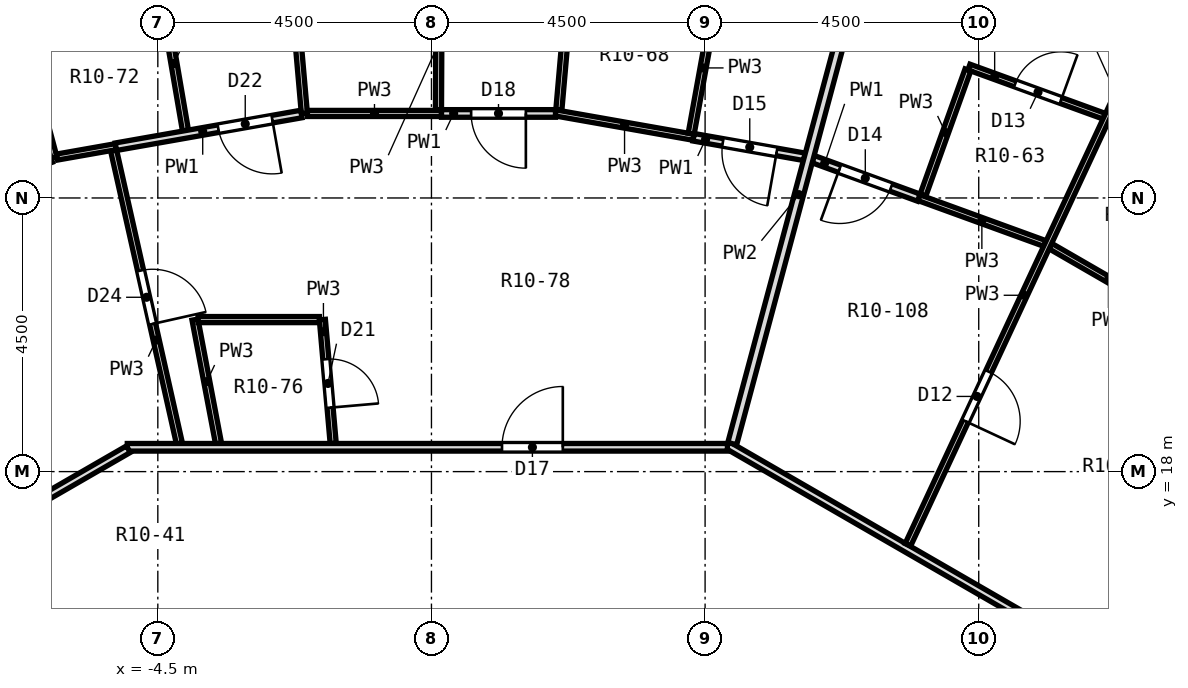
"""IFC4 building model, lengths in metres.
Left out: names, types, materials, properties, quantities, classifications, styles, units other than length and angle.
Written with IfcOpenShell. Run it as: python <this file> out.ifc"""

import sys

from ifc_helpers import new_model, si_unit, direction, frame, frame_2d, origin, place, context, subcontext, project, spatial, rectangle, extrude, element, fill, save


model = new_model("IFC4")
c1 = context("Model", 3, precision=1e-05, world=origin(), true_north=direction((0.0, 1.0)))
c2 = subcontext(c1, "Body", "Model", "MODEL_VIEW")
j1 = project(units=[si_unit("LENGTHUNIT", "METRE"), si_unit("PLANEANGLEUNIT", "RADIAN")], contexts=[c1])
p1 = place(None, origin())
s1 = spatial("IfcSite", under=j1, at=p1, CompositionType="ELEMENT")
p2 = place(p1, origin())
s2 = spatial("IfcBuilding", under=s1, at=p2, CompositionType="ELEMENT")
p3 = place(p2, frame((0.0, 0.0, 36.2)))
s3 = spatial("IfcBuildingStorey", under=s2, at=p3, CompositionType="ELEMENT", Elevation=36.2)
p4 = place(p3, frame((-2.404, 27.485, 0.0), z_axis=(0.0, 0.0, 1.0), x_axis=(0.08706456859, -0.996202670593, 0.0)))
e1 = element("IfcWall", 1, at=p4, inside=s3, PredefinedType="PARTITIONING", context=c2, shape_type="SweptSolid", body=[
    extrude(rectangle(XDim=3.609, YDim=0.1, at=frame_2d((1.804, 0.0))), origin(), (0.0, 0.0, 1.0), 2.75),
])
p5 = place(p3, frame((-1.794, 20.5, 0.0), z_axis=(0.0, 0.0, 1.0), x_axis=(0.087005571392, -0.996207824978, 0.0)))
e2 = element("IfcWall", 2, at=p5, inside=s3, PredefinedType="PARTITIONING", context=c2, shape_type="SweptSolid", body=[
    extrude(rectangle(XDim=2.046, YDim=0.1, at=frame_2d((1.023, 0.0))), origin(), (0.0, 0.0, 1.0), 2.75),
])
p6 = place(p5, frame((0.654, 0.0, 0.0)))
e3 = element("IfcOpeningElement", 3, at=p6, cuts=e2, PredefinedType="OPENING", context=c2, shape_type="SweptSolid", body=[
    extrude(rectangle(XDim=0.8, YDim=2.1, at=frame_2d((0.4, 1.05))), frame((0.0, 0.062, 0.0), z_axis=(0.0, -1.0, 0.0), x_axis=(1.0, 0.0, 0.0)), (0.0, 0.0, 1.0), 0.124),
])
p7 = place(p3, frame((-4.423, 25.814, 0.0), z_axis=(0.0, 0.0, 1.0), x_axis=(0.168697286213, -0.985667908387, 0.0)))
e4 = element("IfcWall", 4, at=p7, inside=s3, PredefinedType="PARTITIONING", context=c2, shape_type="SweptSolid", body=[
    extrude(rectangle(XDim=2.237, YDim=0.1, at=frame_2d((1.119, 0.0))), origin(), (0.0, 0.0, 1.0), 2.75),
])
p8 = place(p3, frame((-3.889, 20.5, 0.0), z_axis=(0.0, 0.0, 1.0), x_axis=(0.186603866767, -0.982435238022, 0.0)))
e5 = element("IfcWall", 5, at=p8, inside=s3, PredefinedType="PARTITIONING", context=c2, shape_type="SweptSolid", body=[
    extrude(rectangle(XDim=2.075, YDim=0.1, at=frame_2d((1.038, 0.0))), origin(), (0.0, 0.0, 1.0), 2.75),
])
p9 = place(p3, frame((-5.228, 23.285, 0.0), z_axis=(0.0, 0.0, 1.0), x_axis=(0.219089188196, -0.975704836319, 0.0)))
e6 = element("IfcWall", 6, at=p9, inside=s3, PredefinedType="PARTITIONING", context=c2, shape_type="SweptSolid", body=[
    extrude(rectangle(XDim=4.944, YDim=0.1, at=frame_2d((2.472, 0.0))), origin(), (0.0, 0.0, 1.0), 2.75),
])
p10 = place(p9, frame((2.028, 0.0, 0.0)))
e7 = element("IfcOpeningElement", 7, at=p10, cuts=e6, PredefinedType="OPENING", context=c2, shape_type="SweptSolid", body=[
    extrude(rectangle(XDim=0.9, YDim=2.1, at=frame_2d((0.45, 1.05))), frame((0.0, 0.062, 0.0), z_axis=(0.0, -1.0, 0.0), x_axis=(1.0, 0.0, 0.0)), (0.0, 0.0, 1.0), 0.124),
])
p11 = place(p3, frame((-7.143, 26.649, 0.0), z_axis=(0.0, 0.0, 1.0), x_axis=(0.259371754041, -0.965777558864, 0.0)))
e8 = element("IfcWall", 8, at=p11, inside=s3, PredefinedType="PARTITIONING", context=c2, shape_type="SweptSolid", body=[
    extrude(rectangle(XDim=3.609, YDim=0.1, at=frame_2d((1.804, 0.0))), origin(), (0.0, 0.0, 1.0), 2.75),
])
p12 = place(p3, frame((4.867, 18.436, 0.0), z_axis=(0.0, 0.0, 1.0), x_axis=(0.86605048973, -0.49995654735, 0.0)))
e9 = element("IfcWall", 9, at=p12, inside=s3, PredefinedType="PARTITIONING", context=c2, shape_type="SweptSolid", body=[
    extrude(rectangle(XDim=9.871, YDim=0.125, at=frame_2d((4.935, 0.0))), origin(), (0.0, 0.0, 1.0), 2.75),
])
p13 = place(p3, frame((10.178, 21.709, 0.0), z_axis=(0.0, 0.0, 1.0), x_axis=(0.865986508459, -0.50006736263, 0.0)))
e10 = element("IfcWall", 10, at=p13, inside=s3, PredefinedType="PARTITIONING", context=c2, shape_type="SweptSolid", body=[
    extrude(rectangle(XDim=2.206, YDim=0.1, at=frame_2d((1.103, 0.0))), origin(), (0.0, 0.0, 1.0), 2.75),
])
p14 = place(p3, frame((11.154, 23.802, 0.0), z_axis=(0.0, 0.0, 1.0), x_axis=(0.865910737143, -0.500198555877, 0.0)))
e11 = element("IfcWall", 11, at=p14, inside=s3, PredefinedType="PARTITIONING", context=c2, shape_type="SweptSolid", body=[
    extrude(rectangle(XDim=2.367, YDim=0.1, at=frame_2d((1.184, 0.0))), origin(), (0.0, 0.0, 1.0), 2.75),
])
p15 = place(p14, frame((0.759, 0.0, 0.0)))
e12 = element("IfcOpeningElement", 12, at=p15, cuts=e11, PredefinedType="OPENING", context=c2, shape_type="SweptSolid", body=[
    extrude(rectangle(XDim=0.8, YDim=2.1, at=frame_2d((0.4, 1.05))), frame((0.0, 0.062, 0.0), z_axis=(0.0, -1.0, 0.0), x_axis=(1.0, 0.0, 0.0)), (0.0, 0.0, 1.0), 0.124),
])
p16 = place(p3, frame((8.015, 22.505, 0.0), z_axis=(0.0, 0.0, 1.0), x_axis=(0.939744943051, -0.341876354856, 0.0)))
e13 = element("IfcWall", 13, at=p16, inside=s3, PredefinedType="PARTITIONING", context=c2, shape_type="SweptSolid", body=[
    extrude(rectangle(XDim=2.206, YDim=0.1, at=frame_2d((1.103, 0.0))), origin(), (0.0, 0.0, 1.0), 2.75),
])
p17 = place(p3, frame((6.278, 23.138, 0.0), z_axis=(0.0, 0.0, 1.0), x_axis=(0.939538772486, -0.34244254262, 0.0)))
e14 = element("IfcWall", 14, at=p17, inside=s3, PredefinedType="PARTITIONING", context=c2, shape_type="SweptSolid", body=[
    extrude(rectangle(XDim=1.849, YDim=0.125, at=frame_2d((0.925, 0.0))), origin(), (0.0, 0.0, 1.0), 2.75),
])
p18 = place(p17, frame((0.462, 0.0, 0.0)))
e15 = element("IfcOpeningElement", 15, at=p18, cuts=e14, PredefinedType="OPENING", context=c2, shape_type="SweptSolid", body=[
    extrude(rectangle(XDim=0.9, YDim=2.1, at=frame_2d((0.45, 1.05))), frame((0.0, 0.074, 0.0), z_axis=(0.0, -1.0, 0.0), x_axis=(1.0, 0.0, 0.0)), (0.0, 0.0, 1.0), 0.149),
])
p19 = place(p3, frame((8.839, 24.653, 0.0), z_axis=(0.0, 0.0, 1.0), x_axis=(0.939787401385, -0.341759623416, 0.0)))
e16 = element("IfcWall", 16, at=p19, inside=s3, PredefinedType="PARTITIONING", context=c2, shape_type="SweptSolid", body=[
    extrude(rectangle(XDim=2.367, YDim=0.1, at=frame_2d((1.184, 0.0))), origin(), (0.0, 0.0, 1.0), 2.75),
])
p20 = place(p19, frame((0.809, 0.0, 0.0)))
e17 = element("IfcOpeningElement", 17, at=p20, cuts=e16, PredefinedType="OPENING", context=c2, shape_type="SweptSolid", body=[
    extrude(rectangle(XDim=0.8, YDim=2.1, at=frame_2d((0.4, 1.05))), frame((0.0, 0.062, 0.0), z_axis=(0.0, -1.0, 0.0), x_axis=(1.0, 0.0, 0.0)), (0.0, 0.0, 1.0), 0.124),
])
p21 = place(p3, frame((2.04, 23.899, 0.0), z_axis=(0.0, 0.0, 1.0), x_axis=(0.984796344358, -0.173712866935, 0.0)))
e18 = element("IfcWall", 18, at=p21, inside=s3, PredefinedType="PARTITIONING", context=c2, shape_type="SweptSolid", body=[
    extrude(rectangle(XDim=2.306, YDim=0.1, at=frame_2d((1.153, 0.0))), origin(), (0.0, 0.0, 1.0), 2.75),
])
p22 = place(p3, frame((4.311, 23.498, 0.0), z_axis=(0.0, 0.0, 1.0), x_axis=(0.984802153769, -0.173679929558, 0.0)))
e19 = element("IfcWall", 19, at=p22, inside=s3, PredefinedType="PARTITIONING", context=c2, shape_type="SweptSolid", body=[
    extrude(rectangle(XDim=1.85, YDim=0.125, at=frame_2d((0.925, 0.0))), origin(), (0.0, 0.0, 1.0), 2.75),
])
p23 = place(p22, frame((0.488, 0.0, 0.0)))
e20 = element("IfcOpeningElement", 20, at=p23, cuts=e19, PredefinedType="OPENING", context=c2, shape_type="SweptSolid", body=[
    extrude(rectangle(XDim=0.9, YDim=2.1, at=frame_2d((0.45, 1.05))), frame((0.0, 0.074, 0.0), z_axis=(0.0, -1.0, 0.0), x_axis=(1.0, 0.0, 0.0)), (0.0, 0.0, 1.0), 0.149),
])
p24 = place(p3, frame((-5.002, 18.4, 0.0), z_axis=(0.0, 0.0, 1.0), x_axis=(1.0, 0.0, 0.0)))
e21 = element("IfcWall", 21, at=p24, inside=s3, PredefinedType="PARTITIONING", context=c2, shape_type="SweptSolid", body=[
    extrude(rectangle(XDim=9.87, YDim=0.125, at=frame_2d((4.935, 0.0))), origin(), (0.0, 0.0, 1.0), 2.75),
])
p25 = place(p24, frame((6.162, 0.0, 0.0)))
e22 = element("IfcOpeningElement", 22, at=p25, cuts=e21, PredefinedType="OPENING", context=c2, shape_type="SweptSolid", body=[
    extrude(rectangle(XDim=1.0, YDim=2.1, at=frame_2d((0.5, 1.05))), frame((0.0, 0.074, 0.0), z_axis=(0.0, -1.0, 0.0), x_axis=(1.0, 0.0, 0.0)), (0.0, 0.0, 1.0), 0.149),
])
p26 = place(p3, frame((-3.839, 20.5, 0.0), z_axis=(0.0, 0.0, 1.0), x_axis=(1.0, 0.0, 0.0)))
e23 = element("IfcWall", 23, at=p26, inside=s3, PredefinedType="PARTITIONING", context=c2, shape_type="SweptSolid", body=[
    extrude(rectangle(XDim=1.995, YDim=0.1, at=frame_2d((0.998, 0.0))), origin(), (0.0, 0.0, 1.0), 2.75),
])
p27 = place(p3, frame((-2.04, 23.89, 0.0), z_axis=(0.0, 0.0, 1.0), x_axis=(1.0, 0.0, 0.0)))
e24 = element("IfcWall", 24, at=p27, inside=s3, PredefinedType="PARTITIONING", context=c2, shape_type="SweptSolid", body=[
    extrude(rectangle(XDim=2.205, YDim=0.1, at=frame_2d((1.103, 0.0))), origin(), (0.0, 0.0, 1.0), 2.75),
])
p28 = place(p3, frame((0.165, 23.89, 0.0), z_axis=(0.0, 0.0, 1.0), x_axis=(1.0, 0.0, 0.0)))
e25 = element("IfcWall", 25, at=p28, inside=s3, PredefinedType="PARTITIONING", context=c2, shape_type="SweptSolid", body=[
    extrude(rectangle(XDim=1.875, YDim=0.125, at=frame_2d((0.938, 0.0))), origin(), (0.0, 0.0, 1.0), 2.75),
])
p29 = place(p28, frame((0.488, 0.0, 0.0)))
e26 = element("IfcOpeningElement", 26, at=p29, cuts=e25, PredefinedType="OPENING", context=c2, shape_type="SweptSolid", body=[
    extrude(rectangle(XDim=0.9, YDim=2.1, at=frame_2d((0.45, 1.05))), frame((0.0, 0.074, 0.0), z_axis=(0.0, -1.0, 0.0), x_axis=(1.0, 0.0, 0.0)), (0.0, 0.0, 1.0), 0.149),
])
p30 = place(p3, frame((-6.158, 23.173, 0.0), z_axis=(0.0, 0.0, 1.0), x_axis=(0.984806059991, 0.173657778994, 0.0)))
e27 = element("IfcWall", 27, at=p30, inside=s3, PredefinedType="PARTITIONING", context=c2, shape_type="SweptSolid", body=[
    extrude(rectangle(XDim=0.983, YDim=0.1, at=frame_2d((0.491, 0.0))), origin(), (0.0, 0.0, 1.0), 2.75),
])
p31 = place(p3, frame((-5.19, 23.343, 0.0), z_axis=(0.0, 0.0, 1.0), x_axis=(0.984810524367, 0.173632459798, 0.0)))
e28 = element("IfcWall", 28, at=p31, inside=s3, PredefinedType="PARTITIONING", context=c2, shape_type="SweptSolid", body=[
    extrude(rectangle(XDim=3.098, YDim=0.125, at=frame_2d((1.549, 0.0))), origin(), (0.0, 0.0, 1.0), 2.75),
])
p32 = place(p31, frame((1.71, 0.0, 0.0)))
e29 = element("IfcOpeningElement", 29, at=p32, cuts=e28, PredefinedType="OPENING", context=c2, shape_type="SweptSolid", body=[
    extrude(rectangle(XDim=0.9, YDim=2.1, at=frame_2d((0.45, 1.05))), frame((0.0, 0.074, 0.0), z_axis=(0.0, -1.0, 0.0), x_axis=(1.0, 0.0, 0.0)), (0.0, 0.0, 1.0), 0.149),
])
p33 = place(p3, frame((-8.015, 22.505, 0.0), z_axis=(0.0, 0.0, 1.0), x_axis=(0.939553626447, 0.342401785962, 0.0)))
e30 = element("IfcWall", 30, at=p33, inside=s3, PredefinedType="PARTITIONING", context=c2, shape_type="SweptSolid", body=[
    extrude(rectangle(XDim=1.875, YDim=0.125, at=frame_2d((0.937, 0.0))), origin(), (0.0, 0.0, 1.0), 2.75),
])
p34 = place(p33, frame((0.487, 0.0, 0.0)))
e31 = element("IfcOpeningElement", 31, at=p34, cuts=e30, PredefinedType="OPENING", context=c2, shape_type="SweptSolid", body=[
    extrude(rectangle(XDim=0.9, YDim=2.1, at=frame_2d((0.45, 1.05))), frame((0.0, 0.074, 0.0), z_axis=(0.0, -1.0, 0.0), x_axis=(1.0, 0.0, 0.0)), (0.0, 0.0, 1.0), 0.149),
])
p35 = place(p3, frame((-13.532, 13.434, 0.0), z_axis=(0.0, 0.0, 1.0), x_axis=(0.86605048973, 0.49995654735, 0.0)))
e32 = element("IfcWall", 32, at=p35, inside=s3, PredefinedType="PARTITIONING", context=c2, shape_type="SweptSolid", body=[
    extrude(rectangle(XDim=9.871, YDim=0.125, at=frame_2d((4.935, 0.0))), origin(), (0.0, 0.0, 1.0), 2.75),
])
p36 = place(p35, frame((4.931, 0.0, 0.0)))
e33 = element("IfcOpeningElement", 33, at=p36, cuts=e32, PredefinedType="OPENING", context=c2, shape_type="SweptSolid", body=[
    extrude(rectangle(XDim=1.0, YDim=2.1, at=frame_2d((0.5, 1.05))), frame((0.0, 0.074, 0.0), z_axis=(0.0, -1.0, 0.0), x_axis=(1.0, 0.0, 0.0)), (0.0, 0.0, 1.0), 0.149),
])
p37 = place(p35, frame((1.711, 0.0, 0.0)))
e34 = element("IfcOpeningElement", 34, at=p37, cuts=e32, PredefinedType="OPENING", context=c2, shape_type="SweptSolid", body=[
    extrude(rectangle(XDim=0.9, YDim=2.1, at=frame_2d((0.45, 1.05))), frame((0.0, 0.074, 0.0), z_axis=(0.0, -1.0, 0.0), x_axis=(1.0, 0.0, 0.0)), (0.0, 0.0, 1.0), 0.149),
])
p38 = place(p3, frame((7.835, 16.796, 0.0), z_axis=(0.0, 0.0, 1.0), x_axis=(0.422351185038, 0.906432279046, 0.0)))
e35 = element("IfcWall", 35, at=p38, inside=s3, PredefinedType="PARTITIONING", context=c2, shape_type="SweptSolid", body=[
    extrude(rectangle(XDim=9.057, YDim=0.1, at=frame_2d((4.528, 0.0))), origin(), (0.0, 0.0, 1.0), 2.75),
])
p39 = place(p38, frame((2.243, 0.0, 0.0)))
e36 = element("IfcOpeningElement", 36, at=p39, cuts=e35, PredefinedType="OPENING", context=c2, shape_type="SweptSolid", body=[
    extrude(rectangle(XDim=0.9, YDim=2.1, at=frame_2d((0.45, 1.05))), frame((0.0, 0.062, 0.0), z_axis=(0.0, -1.0, 0.0), x_axis=(1.0, 0.0, 0.0)), (0.0, 0.0, 1.0), 0.124),
])
p40 = place(p3, frame((8.083, 22.547, 0.0), z_axis=(0.0, 0.0, 1.0), x_axis=(0.337806451735, 0.9412155976, 0.0)))
e37 = element("IfcWall", 37, at=p40, inside=s3, PredefinedType="PARTITIONING", context=c2, shape_type="SweptSolid", body=[
    extrude(rectangle(XDim=2.188, YDim=0.1, at=frame_2d((1.094, 0.0))), origin(), (0.0, 0.0, 1.0), 2.75),
])
p41 = place(p3, frame((4.947, 18.46, 0.0), z_axis=(0.0, 0.0, 1.0), x_axis=(0.258782623342, 0.965935584734, 0.0)))
e38 = element("IfcWall", 38, at=p41, inside=s3, PredefinedType="PARTITIONING", context=c2, shape_type="SweptSolid", body=[
    extrude(rectangle(XDim=8.479, YDim=0.15, at=frame_2d((4.239, 0.0))), origin(), (0.0, 0.0, 1.0), 2.75),
])
p42 = place(p3, frame((4.271, 23.556, 0.0), z_axis=(0.0, 0.0, 1.0), x_axis=(0.178240802931, 0.983986898373, 0.0)))
e39 = element("IfcWall", 39, at=p42, inside=s3, PredefinedType="PARTITIONING", context=c2, shape_type="SweptSolid", body=[
    extrude(rectangle(XDim=2.2, YDim=0.1, at=frame_2d((1.1, 0.0))), origin(), (0.0, 0.0, 1.0), 2.75),
])
p43 = place(p3, frame((2.095, 23.952, 0.0), z_axis=(0.0, 0.0, 1.0), x_axis=(0.087084114239, 0.996200962179, 0.0)))
e40 = element("IfcWall", 40, at=p43, inside=s3, PredefinedType="PARTITIONING", context=c2, shape_type="SweptSolid", body=[
    extrude(rectangle(XDim=3.546, YDim=0.1, at=frame_2d((1.773, 0.0))), origin(), (0.0, 0.0, 1.0), 2.75),
])
p44 = place(p3, frame((0.115, 23.952, 0.0), z_axis=(0.0, 0.0, 1.0), x_axis=(0.004799051879, 0.999988484484, 0.0)))
e41 = element("IfcWall", 41, at=p44, inside=s3, PredefinedType="PARTITIONING", context=c2, shape_type="SweptSolid", body=[
    extrude(rectangle(XDim=2.188, YDim=0.1, at=frame_2d((1.094, 0.0))), origin(), (0.0, 0.0, 1.0), 2.75),
])
p45 = place(p39, frame((0.9, 0.0, 0.0), z_axis=(0.0, 0.0, 1.0), x_axis=(-1.0, 0.0, 0.0)))
e42 = element("IfcDoor", 42, at=p45, inside=s3, OperationType="SINGLE_SWING_RIGHT", PredefinedType="DOOR", context=c2, shape_type="SweptSolid", body=[
    extrude(rectangle(XDim=0.9, YDim=2.1, at=frame_2d((0.45, 1.05))), frame((0.0, 0.025, 0.0), z_axis=(0.0, -1.0, 0.0), x_axis=(1.0, 0.0, 0.0)), (0.0, 0.0, 1.0), 0.05),
])
fill(e36, e42)
p46 = place(p20, origin())
e43 = element("IfcDoor", 43, at=p46, inside=s3, OperationType="SINGLE_SWING_RIGHT", PredefinedType="DOOR", context=c2, shape_type="SweptSolid", body=[
    extrude(rectangle(XDim=0.8, YDim=2.1, at=frame_2d((0.4, 1.05))), frame((0.0, 0.025, 0.0), z_axis=(0.0, -1.0, 0.0), x_axis=(1.0, 0.0, 0.0)), (0.0, 0.0, 1.0), 0.05),
])
fill(e17, e43)
p47 = place(p18, frame((0.9, 0.0, 0.0), z_axis=(0.0, 0.0, 1.0), x_axis=(-1.0, 0.0, 0.0)))
e44 = element("IfcDoor", 44, at=p47, inside=s3, OperationType="SINGLE_SWING_RIGHT", PredefinedType="DOOR", context=c2, shape_type="SweptSolid", body=[
    extrude(rectangle(XDim=0.9, YDim=2.1, at=frame_2d((0.45, 1.05))), frame((0.0, 0.025, 0.0), z_axis=(0.0, -1.0, 0.0), x_axis=(1.0, 0.0, 0.0)), (0.0, 0.0, 1.0), 0.05),
])
fill(e15, e44)
p48 = place(p23, frame((0.9, 0.0, 0.0), z_axis=(0.0, 0.0, 1.0), x_axis=(-1.0, 0.0, 0.0)))
e45 = element("IfcDoor", 45, at=p48, inside=s3, OperationType="SINGLE_SWING_LEFT", PredefinedType="DOOR", context=c2, shape_type="SweptSolid", body=[
    extrude(rectangle(XDim=0.9, YDim=2.1, at=frame_2d((0.45, 1.05))), frame((0.0, 0.025, 0.0), z_axis=(0.0, -1.0, 0.0), x_axis=(1.0, 0.0, 0.0)), (0.0, 0.0, 1.0), 0.05),
])
fill(e20, e45)
p49 = place(p25, origin())
e46 = element("IfcDoor", 46, at=p49, inside=s3, OperationType="SINGLE_SWING_RIGHT", PredefinedType="DOOR", context=c2, shape_type="SweptSolid", body=[
    extrude(rectangle(XDim=1.0, YDim=2.1, at=frame_2d((0.5, 1.05))), frame((0.0, 0.025, 0.0), z_axis=(0.0, -1.0, 0.0), x_axis=(1.0, 0.0, 0.0)), (0.0, 0.0, 1.0), 0.05),
])
fill(e22, e46)
p50 = place(p29, frame((0.9, 0.0, 0.0), z_axis=(0.0, 0.0, 1.0), x_axis=(-1.0, 0.0, 0.0)))
e47 = element("IfcDoor", 47, at=p50, inside=s3, OperationType="SINGLE_SWING_LEFT", PredefinedType="DOOR", context=c2, shape_type="SweptSolid", body=[
    extrude(rectangle(XDim=0.9, YDim=2.1, at=frame_2d((0.45, 1.05))), frame((0.0, 0.025, 0.0), z_axis=(0.0, -1.0, 0.0), x_axis=(1.0, 0.0, 0.0)), (0.0, 0.0, 1.0), 0.05),
])
fill(e26, e47)
p51 = place(p6, origin())
e48 = element("IfcDoor", 48, at=p51, inside=s3, OperationType="SINGLE_SWING_RIGHT", PredefinedType="DOOR", context=c2, shape_type="SweptSolid", body=[
    extrude(rectangle(XDim=0.8, YDim=2.1, at=frame_2d((0.4, 1.05))), frame((0.0, 0.025, 0.0), z_axis=(0.0, -1.0, 0.0), x_axis=(1.0, 0.0, 0.0)), (0.0, 0.0, 1.0), 0.05),
])
fill(e3, e48)
p52 = place(p32, frame((0.9, 0.0, 0.0), z_axis=(0.0, 0.0, 1.0), x_axis=(-1.0, 0.0, 0.0)))
e49 = element("IfcDoor", 49, at=p52, inside=s3, OperationType="SINGLE_SWING_LEFT", PredefinedType="DOOR", context=c2, shape_type="SweptSolid", body=[
    extrude(rectangle(XDim=0.9, YDim=2.1, at=frame_2d((0.45, 1.05))), frame((0.0, 0.025, 0.0), z_axis=(0.0, -1.0, 0.0), x_axis=(1.0, 0.0, 0.0)), (0.0, 0.0, 1.0), 0.05),
])
fill(e29, e49)
p53 = place(p10, origin())
e50 = element("IfcDoor", 50, at=p53, inside=s3, OperationType="SINGLE_SWING_RIGHT", PredefinedType="DOOR", context=c2, shape_type="SweptSolid", body=[
    extrude(rectangle(XDim=0.9, YDim=2.1, at=frame_2d((0.45, 1.05))), frame((0.0, 0.025, 0.0), z_axis=(0.0, -1.0, 0.0), x_axis=(1.0, 0.0, 0.0)), (0.0, 0.0, 1.0), 0.05),
])
fill(e7, e50)
save(model, sys.argv[1])
